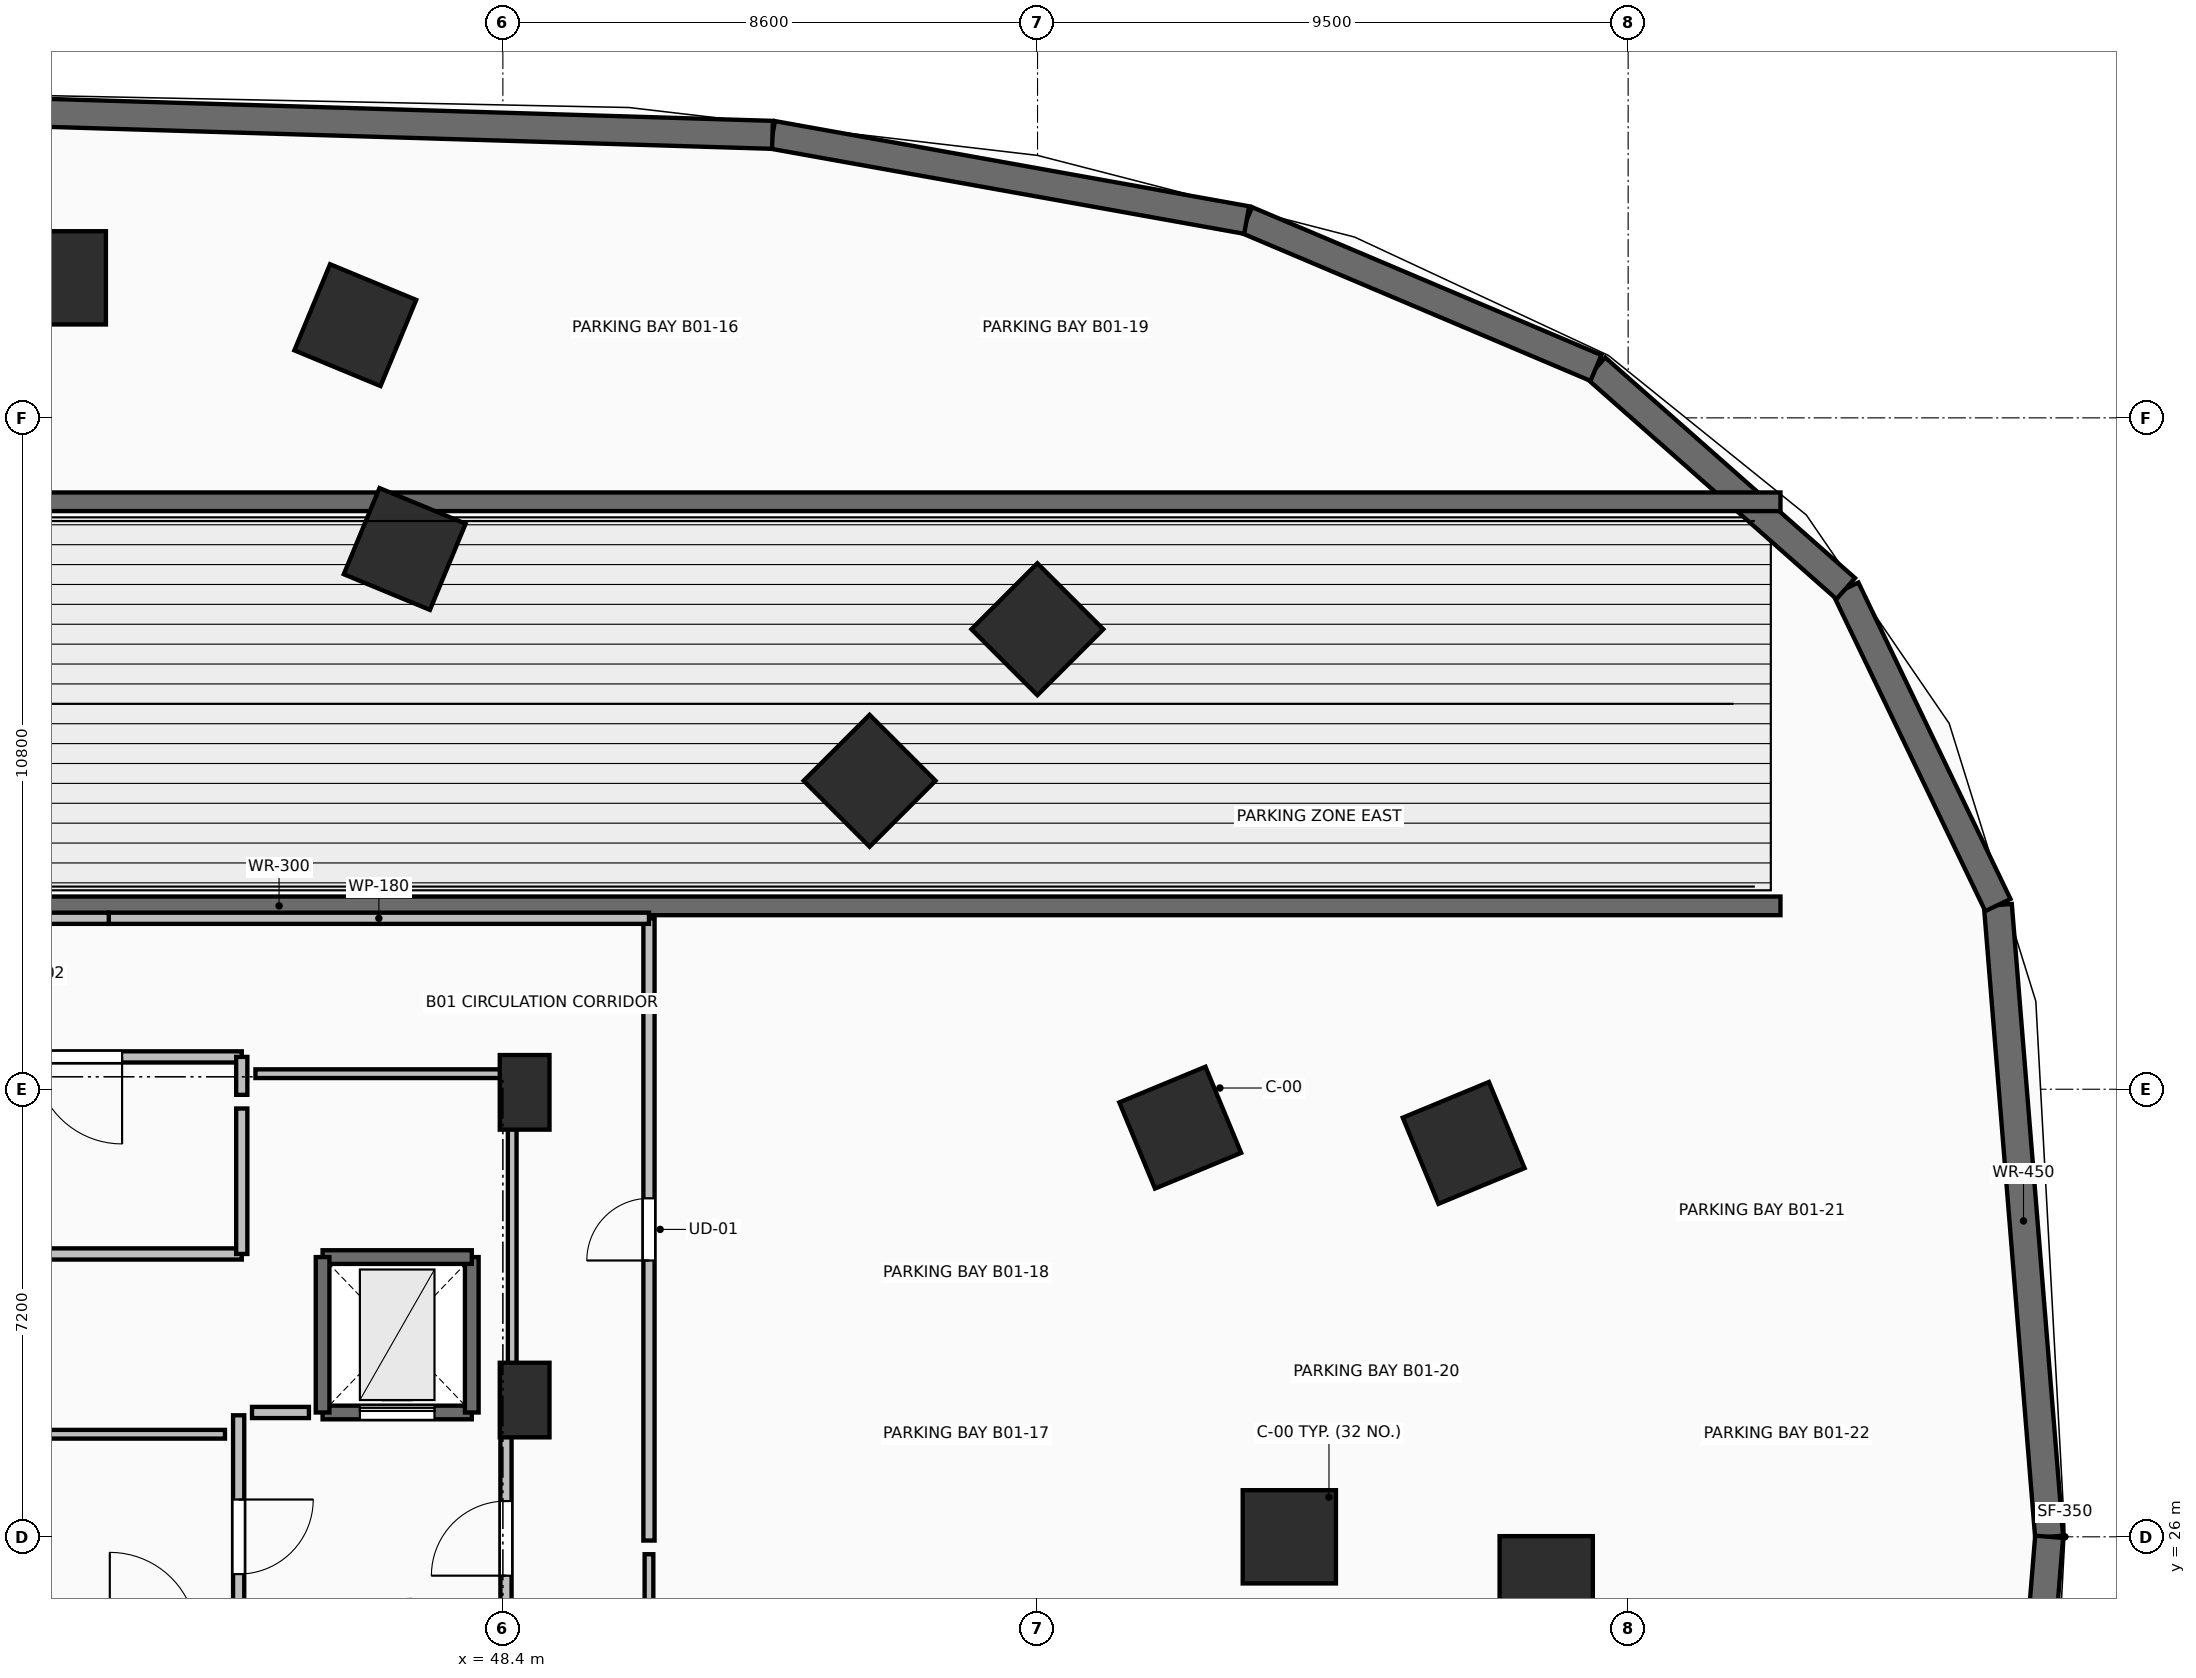
"""IFC4 building model, lengths in metres.
Left out: names, types, materials, properties, quantities, classifications, styles, units other than length and angle.
Written with IfcOpenShell. Run it as: python <this file> out.ifc"""

import sys

from ifc_helpers import new_model, si_unit, direction, frame, frame_2d, origin, origin_2d, place, context, subcontext, project, spatial, rectangle, extrude, element, fill, save


model = new_model("IFC4")
c1 = context("Model", 3, precision=1e-05, world=origin(), true_north=direction((0.0, 1.0)))
c2 = subcontext(c1, "Body", "Model", "MODEL_VIEW")
j1 = project(units=[si_unit("LENGTHUNIT", "METRE"), si_unit("PLANEANGLEUNIT", "RADIAN")], contexts=[c1])
p1 = place(None, origin())
s1 = spatial("IfcSite", under=j1, at=p1, CompositionType="ELEMENT")
p2 = place(p1, origin())
s2 = spatial("IfcBuilding", under=s1, at=p2, CompositionType="ELEMENT")
p3 = place(p2, frame((0.0, 0.0, -4.8)))
s3 = spatial("IfcBuildingStorey", under=s2, at=p3, CompositionType="ELEMENT", Elevation=-4.8)
for number, where, z_axis, x_axis in (
    (1, (61.05, 26.0, 0.0), (0.0, 0.0, 1.0), (1.0, 0.0, 0.0)),
    (2, (59.295, 32.582, 0.0), (0.0, 0.0, 1.0), (0.924, 0.383, 0.0)),
    (3, (54.299, 38.162, 0.0), (0.0, 0.0, 1.0), (0.707, 0.707, 0.0)),
    (4, (46.821, 41.891, 0.0), (0.0, 0.0, 1.0), (0.383, 0.924, 0.0)),
    (5, (65.182, 25.261, 0.0), (0.0, 0.0, 1.0), (1.0, 0.0, 0.0)),
    (6, (63.854, 32.337, 0.0), (0.0, 0.0, 1.0), (0.924, 0.383, 0.0)),
    (7, (56.997, 40.6, 0.0), (0.0, 0.0, 1.0), (0.707, 0.707, 0.0)),
    (8, (46.026, 45.492, 0.0), (0.0, 0.0, 1.0), (0.383, 0.924, 0.0)),
    (9, (41.265, 46.252, 0.0), (0.0, 0.0, 1.0), (0.0, 1.0, 0.0)),
):
    element("IfcColumn", number, at=place(p3, frame(where, z_axis=z_axis, x_axis=x_axis)), inside=s3, PredefinedType="COLUMN", context=c2, shape_type="SweptSolid", body=[
        extrude(rectangle(XDim=1.5, YDim=1.5, at=origin_2d()), origin(), (0.0, 0.0, 1.0), 4.8),
    ])
for number, where, z_axis, x_axis in (
    (10, (48.75, 33.15, 0.0), (0.0, 0.0, 1.0), (1.0, 0.0, 0.0)),
    (11, (48.75, 28.2, 0.0), (0.0, 0.0, 1.0), (1.0, 0.0, 0.0)),
):
    element("IfcColumn", number, at=place(p3, frame(where, z_axis=z_axis, x_axis=x_axis)), inside=s3, PredefinedType="PILASTER", context=c2, shape_type="SweptSolid", body=[
        extrude(rectangle(XDim=0.8, YDim=1.2, at=origin_2d()), origin(), (0.0, 0.0, 1.0), 4.8),
    ])
p4 = place(p3, frame((73.271, 26.0, 0.0), z_axis=(0.0, 0.0, 1.0), x_axis=(-0.080835799126, 0.996727431939, 0.0)))
e12 = element("IfcWall", 12, at=p4, inside=s3, PredefinedType="SOLIDWALL", context=c2, shape_type="SweptSolid", body=[
    extrude(rectangle(XDim=10.196, YDim=0.45, at=frame_2d((5.098, 0.0))), origin(), (0.0, 0.0, 1.0), 4.46),
])
p5 = place(p3, frame((72.447, 36.163, 0.0), z_axis=(0.0, 0.0, 1.0), x_axis=(-0.433120243411, 0.901336149695, 0.0)))
e13 = element("IfcWall", 13, at=p5, inside=s3, PredefinedType="SOLIDWALL", context=c2, shape_type="SweptSolid", body=[
    extrude(rectangle(XDim=5.649, YDim=0.45, at=frame_2d((2.824, 0.0))), origin(), (0.0, 0.0, 1.0), 4.46),
])
p6 = place(p3, frame((70.0, 41.254, 0.0), z_axis=(0.0, 0.0, 1.0), x_axis=(-0.749561336725, 0.661934892937, 0.0)))
e14 = element("IfcWall", 14, at=p6, inside=s3, PredefinedType="SOLIDWALL", context=c2, shape_type="SweptSolid", body=[
    extrude(rectangle(XDim=5.361, YDim=0.45, at=frame_2d((2.68, 0.0))), origin(), (0.0, 0.0, 1.0), 4.46),
])
p7 = place(p3, frame((65.982, 44.802, 0.0), z_axis=(0.0, 0.0, 1.0), x_axis=(-0.92081090532, 0.390009328919, 0.0)))
e15 = element("IfcWall", 15, at=p7, inside=s3, PredefinedType="SOLIDWALL", context=c2, shape_type="SweptSolid", body=[
    extrude(rectangle(XDim=6.102, YDim=0.45, at=frame_2d((3.051, 0.0))), origin(), (0.0, 0.0, 1.0), 4.46),
])
p8 = place(p3, frame((60.364, 47.182, 0.0), z_axis=(0.0, 0.0, 1.0), x_axis=(-0.984238318617, 0.176847200051, 0.0)))
e16 = element("IfcWall", 16, at=p8, inside=s3, PredefinedType="SOLIDWALL", context=c2, shape_type="SweptSolid", body=[
    extrude(rectangle(XDim=7.749, YDim=0.45, at=frame_2d((3.875, 0.0))), origin(), (0.0, 0.0, 1.0), 4.46),
])
p9 = place(p3, frame((52.737, 48.553, 0.0), z_axis=(0.0, 0.0, 1.0), x_axis=(-0.999540251976, 0.030319707786, 0.0)))
e17 = element("IfcWall", 17, at=p9, inside=s3, PredefinedType="SOLIDWALL", context=c2, shape_type="SweptSolid", body=[
    extrude(rectangle(XDim=14.744, YDim=0.45, at=frame_2d((7.372, 0.0))), origin(), (0.0, 0.0, 1.0), 4.46),
])
p10 = place(p3, frame((72.447, 15.837, 0.0), z_axis=(0.0, 0.0, 1.0), x_axis=(0.080835799126, 0.996727431939, 0.0)))
e18 = element("IfcWall", 18, at=p10, inside=s3, PredefinedType="SOLIDWALL", context=c2, shape_type="SweptSolid", body=[
    extrude(rectangle(XDim=10.196, YDim=0.45, at=frame_2d((5.098, 0.0))), origin(), (0.0, 0.0, 1.0), 4.46),
])
for number, where, z_axis, x_axis in (
    (19, (20.65, 36.15, 0.0), (0.0, 0.0, 1.0), (1.0, 0.0, 0.0)),
    (20, (20.65, 42.65, 0.0), (0.0, 0.0, 1.0), (1.0, 0.0, 0.0)),
):
    element("IfcWall", number, at=place(p3, frame(where, z_axis=z_axis, x_axis=x_axis)), inside=s3, PredefinedType="SOLIDWALL", context=c2, shape_type="SweptSolid", body=[
        extrude(rectangle(XDim=48.3, YDim=0.3, at=frame_2d((24.15, 0.0))), origin(), (0.0, 0.0, 1.0), 4.46),
    ])
p11 = place(p3, frame((45.5, 28.0, 0.0), z_axis=(0.0, 0.0, 1.0), x_axis=(1.0, 0.0, 0.0)))
e21 = element("IfcWall", 21, at=p11, inside=s3, PredefinedType="SHEAR", context=c2, shape_type="SweptSolid", body=[
    extrude(rectangle(XDim=2.4, YDim=0.22, at=frame_2d((1.2, 0.0))), origin(), (0.0, 0.0, 1.0), 4.46),
])
p12 = place(p11, frame((0.6, 0.0, 0.0)))
e22 = element("IfcOpeningElement", 22, at=p12, cuts=e21, PredefinedType="OPENING", context=c2, shape_type="SweptSolid", body=[
    extrude(rectangle(XDim=1.2, YDim=2.2, at=frame_2d((0.6, 1.1))), frame((0.0, 0.125, 0.0), z_axis=(0.0, -1.0, 0.0), x_axis=(1.0, 0.0, 0.0)), (0.0, 0.0, 1.0), 0.25),
])
p13 = place(p3, frame((47.9, 28.0, 0.0), z_axis=(0.0, 0.0, 1.0), x_axis=(0.0, 1.0, 0.0)))
e23 = element("IfcWall", 23, at=p13, inside=s3, PredefinedType="SHEAR", context=c2, shape_type="SweptSolid", body=[
    extrude(rectangle(XDim=2.5, YDim=0.22, at=frame_2d((1.25, 0.0))), origin(), (0.0, 0.0, 1.0), 4.46),
])
p14 = place(p3, frame((47.9, 30.5, 0.0), z_axis=(0.0, 0.0, 1.0), x_axis=(-1.0, 0.0, 0.0)))
e24 = element("IfcWall", 24, at=p14, inside=s3, PredefinedType="SHEAR", context=c2, shape_type="SweptSolid", body=[
    extrude(rectangle(XDim=2.4, YDim=0.22, at=frame_2d((1.2, 0.0))), origin(), (0.0, 0.0, 1.0), 4.46),
])
p15 = place(p3, frame((45.5, 30.5, 0.0), z_axis=(0.0, 0.0, 1.0), x_axis=(0.0, -1.0, 0.0)))
e25 = element("IfcWall", 25, at=p15, inside=s3, PredefinedType="SHEAR", context=c2, shape_type="SweptSolid", body=[
    extrude(rectangle(XDim=2.5, YDim=0.22, at=frame_2d((1.25, 0.0))), origin(), (0.0, 0.0, 1.0), 4.46),
])
p16 = place(p3, frame((44.15, 27.955, 0.0), z_axis=(0.0, 0.0, 1.0), x_axis=(0.0, -1.0, 0.0)))
e26 = element("IfcWall", 26, at=p16, inside=s3, PredefinedType="PARTITIONING", context=c2, shape_type="SweptSolid", body=[
    extrude(rectangle(XDim=3.91, YDim=0.18, at=frame_2d((1.955, 0.0))), origin(), (0.0, 0.0, 1.0), 4.46),
])
p17 = place(p16, frame((1.355, 0.0, 0.0)))
e27 = element("IfcOpeningElement", 27, at=p17, cuts=e26, PredefinedType="OPENING", context=c2, shape_type="SweptSolid", body=[
    extrude(rectangle(XDim=1.2, YDim=2.15, at=frame_2d((0.6, 1.075))), frame((0.0, 0.105, 0.0), z_axis=(0.0, -1.0, 0.0), x_axis=(1.0, 0.0, 0.0)), (0.0, 0.0, 1.0), 0.21),
])
p18 = place(p3, frame((48.45, 23.95, 0.0), z_axis=(0.0, 0.0, 1.0), x_axis=(0.0, 1.0, 0.0)))
e28 = element("IfcWall", 28, at=p18, inside=s3, PredefinedType="PARTITIONING", context=c2, shape_type="SweptSolid", body=[
    extrude(rectangle(XDim=4.05, YDim=0.18, at=frame_2d((2.025, 0.0))), origin(), (0.0, 0.0, 1.0), 3.04),
])
p19 = place(p18, frame((1.425, 0.0, 0.0)))
e29 = element("IfcOpeningElement", 29, at=p19, cuts=e28, PredefinedType="OPENING", context=c2, shape_type="SweptSolid", body=[
    extrude(rectangle(XDim=1.2, YDim=2.15, at=frame_2d((0.6, 1.075))), frame((0.0, 0.105, 0.0), z_axis=(0.0, -1.0, 0.0), x_axis=(1.0, 0.0, 0.0)), (0.0, 0.0, 1.0), 0.21),
])
p20 = place(p3, frame((44.2, 33.72, 0.0), z_axis=(0.0, 0.0, 1.0), x_axis=(-1.0, 0.0, 0.0)))
e30 = element("IfcWall", 30, at=p20, inside=s3, PredefinedType="PARTITIONING", context=c2, shape_type="SweptSolid", body=[
    extrude(rectangle(XDim=5.25, YDim=0.18, at=frame_2d((2.625, 0.0))), origin(), (0.0, 0.0, 1.0), 4.46),
])
p21 = place(p20, frame((1.925, 0.0, 0.0)))
e31 = element("IfcOpeningElement", 31, at=p21, cuts=e30, PredefinedType="OPENING", context=c2, shape_type="SweptSolid", body=[
    extrude(rectangle(XDim=1.4, YDim=2.2, at=frame_2d((0.7, 1.1))), frame((0.0, 0.105, 0.0), z_axis=(0.0, -1.0, 0.0), x_axis=(1.0, 0.0, 0.0)), (0.0, 0.0, 1.0), 0.21),
])
p22 = place(p3, frame((44.2, 33.11, 0.0), z_axis=(0.0, 0.0, 1.0), x_axis=(0.0, 1.0, 0.0)))
e32 = element("IfcWall", 32, at=p22, inside=s3, PredefinedType="PARTITIONING", context=c2, shape_type="SweptSolid", body=[
    extrude(rectangle(XDim=0.61, YDim=0.18, at=frame_2d((0.305, 0.0))), origin(), (0.0, 0.0, 1.0), 4.46),
])
p23 = place(p3, frame((50.75, 25.94, 0.0), z_axis=(0.0, 0.0, 1.0), x_axis=(0.0, 1.0, 0.0)))
e33 = element("IfcWall", 33, at=p23, inside=s3, PredefinedType="PARTITIONING", context=c2, shape_type="SweptSolid", body=[
    extrude(rectangle(XDim=10.01, YDim=0.18, at=frame_2d((5.005, 0.0))), origin(), (0.0, 0.0, 1.0), 3.652),
])
p24 = place(p23, frame((4.505, 0.0, 0.0)))
e34 = element("IfcOpeningElement", 34, at=p24, cuts=e33, PredefinedType="OPENING", context=c2, shape_type="SweptSolid", body=[
    extrude(rectangle(XDim=1.0, YDim=2.15, at=frame_2d((0.5, 1.075))), frame((0.0, 0.105, 0.0), z_axis=(0.0, -1.0, 0.0), x_axis=(1.0, 0.0, 0.0)), (0.0, 0.0, 1.0), 0.21),
])
p25 = place(p3, frame((50.75, 35.95, 0.0), z_axis=(0.0, 0.0, 1.0), x_axis=(-1.0, 0.0, 0.0)))
e35 = element("IfcWall", 35, at=p25, inside=s3, PredefinedType="PARTITIONING", context=c2, shape_type="SweptSolid", body=[
    extrude(rectangle(XDim=8.689, YDim=0.18, at=frame_2d((4.344, 0.0))), origin(), (0.0, 0.0, 1.0), 4.46),
])
p26 = place(p3, frame((42.061, 35.95, 0.0), z_axis=(0.0, 0.0, 1.0), x_axis=(-1.0, 0.0, 0.0)))
e36 = element("IfcWall", 36, at=p26, inside=s3, PredefinedType="PARTITIONING", context=c2, shape_type="SweptSolid", body=[
    extrude(rectangle(XDim=16.811, YDim=0.18, at=frame_2d((8.406, 0.0))), origin(), (0.0, 0.0, 1.0), 4.46),
])
p27 = place(p3, frame((45.28, 28.0, 0.0), z_axis=(0.0, 0.0, 1.0), x_axis=(-1.0, 0.0, 0.0)))
e37 = element("IfcWall", 37, at=p27, inside=s3, PredefinedType="PARTITIONING", context=c2, shape_type="SweptSolid", body=[
    extrude(rectangle(XDim=0.915, YDim=0.18, at=frame_2d((0.458, 0.0))), origin(), (0.0, 0.0, 1.0), 4.46),
])
p28 = place(p3, frame((43.93, 27.65, 0.0), z_axis=(0.0, 0.0, 1.0), x_axis=(-1.0, 0.0, 0.0)))
e38 = element("IfcWall", 38, at=p28, inside=s3, PredefinedType="PARTITIONING", context=c2, shape_type="SweptSolid", body=[
    extrude(rectangle(XDim=11.86, YDim=0.14, at=frame_2d((5.93, 0.0))), origin(), (0.0, 0.0, 1.0), 4.46),
])
p29 = place(p3, frame((39.03, 30.55, 0.0), z_axis=(0.0, 0.0, 1.0), x_axis=(1.0, 0.0, 0.0)))
e39 = element("IfcWall", 39, at=p29, inside=s3, PredefinedType="PARTITIONING", context=c2, shape_type="SweptSolid", body=[
    extrude(rectangle(XDim=5.17, YDim=0.18, at=frame_2d((2.585, 0.0))), origin(), (0.0, 0.0, 1.0), 3.04),
])
p30 = place(p3, frame((44.2, 30.55, 0.0), z_axis=(0.0, 0.0, 1.0), x_axis=(0.0, 1.0, 0.0)))
e40 = element("IfcWall", 40, at=p30, inside=s3, PredefinedType="PARTITIONING", context=c2, shape_type="SweptSolid", body=[
    extrude(rectangle(XDim=2.34, YDim=0.18, at=frame_2d((1.17, 0.0))), origin(), (0.0, 0.0, 1.0), 4.46),
])
p31 = place(p3, frame((44.42, 33.45, 0.0), z_axis=(0.0, 0.0, 1.0), x_axis=(1.0, 0.0, 0.0)))
e41 = element("IfcWall", 41, at=p31, inside=s3, PredefinedType="PARTITIONING", context=c2, shape_type="SweptSolid", body=[
    extrude(rectangle(XDim=4.13, YDim=0.14, at=frame_2d((2.065, 0.0))), origin(), (0.0, 0.0, 1.0), 4.46),
])
p32 = place(p3, frame((48.55, 33.45, 0.0), z_axis=(0.0, 0.0, 1.0), x_axis=(0.0, -1.0, 0.0)))
e42 = element("IfcWall", 42, at=p32, inside=s3, PredefinedType="PARTITIONING", context=c2, shape_type="SweptSolid", body=[
    extrude(rectangle(XDim=5.254, YDim=0.14, at=frame_2d((2.627, 0.0))), origin(), (0.0, 0.0, 1.0), 3.04),
])
p33 = place(p3, frame((50.75, 15.581, 0.0), z_axis=(0.0, 0.0, 1.0), x_axis=(0.0, 1.0, 0.0)))
e43 = element("IfcWall", 43, at=p33, inside=s3, PredefinedType="PARTITIONING", context=c2, shape_type="SweptSolid", body=[
    extrude(rectangle(XDim=10.139, YDim=0.14, at=frame_2d((5.069, 0.0))), origin(), (0.0, 0.0, 1.0), 3.652),
])
p34 = place(p12, origin())
e44 = element("IfcDoor", 44, at=p34, inside=s3, OperationType="SLIDING_TO_LEFT", PredefinedType="DOOR", context=c2, shape_type="SweptSolid", body=[
    extrude(rectangle(XDim=1.2, YDim=2.2, at=frame_2d((0.6, 1.1))), frame((0.0, 0.025, 0.0), z_axis=(0.0, -1.0, 0.0), x_axis=(1.0, 0.0, 0.0)), (0.0, 0.0, 1.0), 0.05),
])
fill(e22, e44)
p35 = place(p17, origin())
e45 = element("IfcDoor", 45, at=p35, inside=s3, OperationType="SINGLE_SWING_LEFT", PredefinedType="DOOR", context=c2, shape_type="SweptSolid", body=[
    extrude(rectangle(XDim=1.2, YDim=2.15, at=frame_2d((0.6, 1.075))), frame((0.0, 0.025, 0.0), z_axis=(0.0, -1.0, 0.0), x_axis=(1.0, 0.0, 0.0)), (0.0, 0.0, 1.0), 0.05),
])
fill(e27, e45)
p36 = place(p19, origin())
e46 = element("IfcDoor", 46, at=p36, inside=s3, OperationType="SINGLE_SWING_LEFT", PredefinedType="DOOR", context=c2, shape_type="SweptSolid", body=[
    extrude(rectangle(XDim=1.2, YDim=2.15, at=frame_2d((0.6, 1.075))), frame((0.0, 0.025, 0.0), z_axis=(0.0, -1.0, 0.0), x_axis=(1.0, 0.0, 0.0)), (0.0, 0.0, 1.0), 0.05),
])
fill(e29, e46)
p37 = place(p21, origin())
e47 = element("IfcDoor", 47, at=p37, inside=s3, OperationType="DOUBLE_SWING_LEFT", PredefinedType="DOOR", context=c2, shape_type="SweptSolid", body=[
    extrude(rectangle(XDim=1.4, YDim=2.2, at=frame_2d((0.7, 1.1))), frame((0.0, 0.025, 0.0), z_axis=(0.0, -1.0, 0.0), x_axis=(1.0, 0.0, 0.0)), (0.0, 0.0, 1.0), 0.05),
])
fill(e31, e47)
p38 = place(p24, origin())
e48 = element("IfcDoor", 48, at=p38, inside=s3, OperationType="SINGLE_SWING_LEFT", PredefinedType="DOOR", context=c2, shape_type="SweptSolid", body=[
    extrude(rectangle(XDim=1.0, YDim=2.15, at=frame_2d((0.5, 1.075))), frame((0.0, 0.025, 0.0), z_axis=(0.0, -1.0, 0.0), x_axis=(1.0, 0.0, 0.0)), (0.0, 0.0, 1.0), 0.05),
])
fill(e34, e48)
save(model, sys.argv[1])
